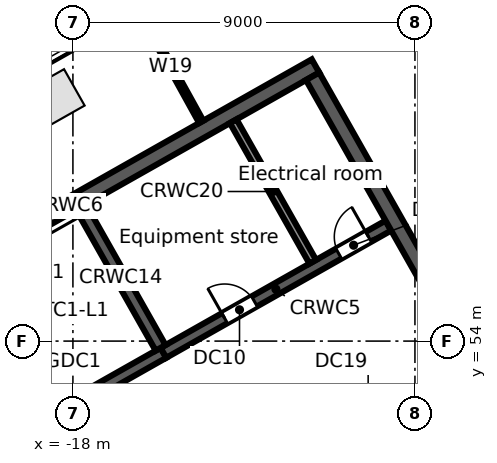
"""IFC4 building model, lengths in metres.
Left out: names, types, materials, properties, quantities, classifications, styles, units other than length and angle.
Written with IfcOpenShell. Run it as: python <this file> out.ifc"""

import sys

from ifc_helpers import new_model, si_unit, direction, frame, frame_2d, origin, origin_2d, place, context, subcontext, project, spatial, rectangle, extrude, element, fill, save


model = new_model("IFC4")
c1 = context("Model", 3, precision=1e-05, world=origin(), true_north=direction((0.0, 1.0)))
c2 = subcontext(c1, "Body", "Model", "MODEL_VIEW")
j1 = project(units=[si_unit("LENGTHUNIT", "METRE"), si_unit("PLANEANGLEUNIT", "RADIAN")], contexts=[c1])
p1 = place(None, origin())
s1 = spatial("IfcSite", under=j1, at=p1, CompositionType="ELEMENT")
p2 = place(p1, origin())
s2 = spatial("IfcBuilding", under=s1, at=p2, CompositionType="ELEMENT")
p3 = place(p2, frame((0.0, 0.0, 293.1)))
s3 = spatial("IfcBuildingStorey", under=s2, at=p3, CompositionType="ELEMENT", Elevation=293.1)
p4 = place(p3, frame((-18.441, 60.406, 0.0), z_axis=(0.0, 0.0, 1.0), x_axis=(-0.87035569594, -0.492423560103, 0.0)))
e1 = element("IfcColumn", 1, at=p4, inside=s3, PredefinedType="COLUMN", context=c2, shape_type="SweptSolid", body=[
    extrude(rectangle(XDim=1.1, YDim=1.1, at=origin_2d()), origin(), (0.0, 0.0, 1.0), 3.8),
])
p5 = place(p3, frame((-58.732, 38.771, 0.0), z_axis=(0.0, 0.0, 1.0), x_axis=(0.870355615581, 0.492423702137, 0.0)))
e2 = element("IfcWall", 2, at=p5, inside=s3, PredefinedType="STANDARD", context=c2, shape_type="SweptSolid", body=[
    extrude(rectangle(XDim=64.052, YDim=0.25, at=frame_2d((32.026, 0.0))), origin(), (0.0, 0.0, 1.0), 3.52),
])
p6 = place(p5, frame((61.259, 0.0, 0.8)))
e3 = element("IfcOpeningElement", 3, at=p6, cuts=e2, PredefinedType="OPENING", context=c2, shape_type="SweptSolid", body=[
    extrude(rectangle(XDim=2.4, YDim=2.2, at=frame_2d((1.2, 1.1))), frame((0.0, 0.135, 0.0), z_axis=(0.0, -1.0, 0.0), x_axis=(1.0, 0.0, 0.0)), (0.0, 0.0, 1.0), 0.27),
])
p7 = place(p5, frame((58.216, 0.0, 0.8)))
e4 = element("IfcOpeningElement", 4, at=p7, cuts=e2, PredefinedType="OPENING", context=c2, shape_type="SweptSolid", body=[
    extrude(rectangle(XDim=2.4, YDim=2.2, at=frame_2d((1.2, 1.1))), frame((0.0, 0.135, 0.0), z_axis=(0.0, -1.0, 0.0), x_axis=(1.0, 0.0, 0.0)), (0.0, 0.0, 1.0), 0.27),
])
p8 = place(p5, frame((55.173, 0.0, 0.8)))
e5 = element("IfcOpeningElement", 5, at=p8, cuts=e2, PredefinedType="OPENING", context=c2, shape_type="SweptSolid", body=[
    extrude(rectangle(XDim=2.4, YDim=2.2, at=frame_2d((1.2, 1.1))), frame((0.0, 0.135, 0.0), z_axis=(0.0, -1.0, 0.0), x_axis=(1.0, 0.0, 0.0)), (0.0, 0.0, 1.0), 0.27),
])
p9 = place(p5, frame((52.129, 0.0, 0.8)))
e6 = element("IfcOpeningElement", 6, at=p9, cuts=e2, PredefinedType="OPENING", context=c2, shape_type="SweptSolid", body=[
    extrude(rectangle(XDim=2.4, YDim=2.2, at=frame_2d((1.2, 1.1))), frame((0.0, 0.135, 0.0), z_axis=(0.0, -1.0, 0.0), x_axis=(1.0, 0.0, 0.0)), (0.0, 0.0, 1.0), 0.27),
])
p10 = place(p5, frame((49.086, 0.0, 0.8)))
e7 = element("IfcOpeningElement", 7, at=p10, cuts=e2, PredefinedType="OPENING", context=c2, shape_type="SweptSolid", body=[
    extrude(rectangle(XDim=2.4, YDim=2.2, at=frame_2d((1.2, 1.1))), frame((0.0, 0.135, 0.0), z_axis=(0.0, -1.0, 0.0), x_axis=(1.0, 0.0, 0.0)), (0.0, 0.0, 1.0), 0.27),
])
p11 = place(p5, frame((46.043, 0.0, 0.8)))
e8 = element("IfcOpeningElement", 8, at=p11, cuts=e2, PredefinedType="OPENING", context=c2, shape_type="SweptSolid", body=[
    extrude(rectangle(XDim=2.4, YDim=2.2, at=frame_2d((1.2, 1.1))), frame((0.0, 0.135, 0.0), z_axis=(0.0, -1.0, 0.0), x_axis=(1.0, 0.0, 0.0)), (0.0, 0.0, 1.0), 0.27),
])
p12 = place(p5, frame((43.0, 0.0, 0.8)))
e9 = element("IfcOpeningElement", 9, at=p12, cuts=e2, PredefinedType="OPENING", context=c2, shape_type="SweptSolid", body=[
    extrude(rectangle(XDim=2.4, YDim=2.2, at=frame_2d((1.2, 1.1))), frame((0.0, 0.135, 0.0), z_axis=(0.0, -1.0, 0.0), x_axis=(1.0, 0.0, 0.0)), (0.0, 0.0, 1.0), 0.27),
])
p13 = place(p5, frame((39.956, 0.0, 0.8)))
e10 = element("IfcOpeningElement", 10, at=p13, cuts=e2, PredefinedType="OPENING", context=c2, shape_type="SweptSolid", body=[
    extrude(rectangle(XDim=2.4, YDim=2.2, at=frame_2d((1.2, 1.1))), frame((0.0, 0.135, 0.0), z_axis=(0.0, -1.0, 0.0), x_axis=(1.0, 0.0, 0.0)), (0.0, 0.0, 1.0), 0.27),
])
p14 = place(p5, frame((36.913, 0.0, 0.8)))
e11 = element("IfcOpeningElement", 11, at=p14, cuts=e2, PredefinedType="OPENING", context=c2, shape_type="SweptSolid", body=[
    extrude(rectangle(XDim=2.4, YDim=2.2, at=frame_2d((1.2, 1.1))), frame((0.0, 0.135, 0.0), z_axis=(0.0, -1.0, 0.0), x_axis=(1.0, 0.0, 0.0)), (0.0, 0.0, 1.0), 0.27),
])
p15 = place(p5, frame((33.87, 0.0, 0.8)))
e12 = element("IfcOpeningElement", 12, at=p15, cuts=e2, PredefinedType="OPENING", context=c2, shape_type="SweptSolid", body=[
    extrude(rectangle(XDim=2.4, YDim=2.2, at=frame_2d((1.2, 1.1))), frame((0.0, 0.135, 0.0), z_axis=(0.0, -1.0, 0.0), x_axis=(1.0, 0.0, 0.0)), (0.0, 0.0, 1.0), 0.27),
])
p16 = place(p5, frame((30.826, 0.0, 0.8)))
e13 = element("IfcOpeningElement", 13, at=p16, cuts=e2, PredefinedType="OPENING", context=c2, shape_type="SweptSolid", body=[
    extrude(rectangle(XDim=2.4, YDim=2.2, at=frame_2d((1.2, 1.1))), frame((0.0, 0.135, 0.0), z_axis=(0.0, -1.0, 0.0), x_axis=(1.0, 0.0, 0.0)), (0.0, 0.0, 1.0), 0.27),
])
p17 = place(p5, frame((27.783, 0.0, 0.8)))
e14 = element("IfcOpeningElement", 14, at=p17, cuts=e2, PredefinedType="OPENING", context=c2, shape_type="SweptSolid", body=[
    extrude(rectangle(XDim=2.4, YDim=2.2, at=frame_2d((1.2, 1.1))), frame((0.0, 0.135, 0.0), z_axis=(0.0, -1.0, 0.0), x_axis=(1.0, 0.0, 0.0)), (0.0, 0.0, 1.0), 0.27),
])
p18 = place(p5, frame((24.74, 0.0, 0.8)))
e15 = element("IfcOpeningElement", 15, at=p18, cuts=e2, PredefinedType="OPENING", context=c2, shape_type="SweptSolid", body=[
    extrude(rectangle(XDim=2.4, YDim=2.2, at=frame_2d((1.2, 1.1))), frame((0.0, 0.135, 0.0), z_axis=(0.0, -1.0, 0.0), x_axis=(1.0, 0.0, 0.0)), (0.0, 0.0, 1.0), 0.27),
])
p19 = place(p5, frame((21.696, 0.0, 0.8)))
e16 = element("IfcOpeningElement", 16, at=p19, cuts=e2, PredefinedType="OPENING", context=c2, shape_type="SweptSolid", body=[
    extrude(rectangle(XDim=2.4, YDim=2.2, at=frame_2d((1.2, 1.1))), frame((0.0, 0.135, 0.0), z_axis=(0.0, -1.0, 0.0), x_axis=(1.0, 0.0, 0.0)), (0.0, 0.0, 1.0), 0.27),
])
p20 = place(p5, frame((18.653, 0.0, 0.8)))
e17 = element("IfcOpeningElement", 17, at=p20, cuts=e2, PredefinedType="OPENING", context=c2, shape_type="SweptSolid", body=[
    extrude(rectangle(XDim=2.4, YDim=2.2, at=frame_2d((1.2, 1.1))), frame((0.0, 0.135, 0.0), z_axis=(0.0, -1.0, 0.0), x_axis=(1.0, 0.0, 0.0)), (0.0, 0.0, 1.0), 0.27),
])
p21 = place(p5, frame((15.61, 0.0, 0.8)))
e18 = element("IfcOpeningElement", 18, at=p21, cuts=e2, PredefinedType="OPENING", context=c2, shape_type="SweptSolid", body=[
    extrude(rectangle(XDim=2.4, YDim=2.2, at=frame_2d((1.2, 1.1))), frame((0.0, 0.135, 0.0), z_axis=(0.0, -1.0, 0.0), x_axis=(1.0, 0.0, 0.0)), (0.0, 0.0, 1.0), 0.27),
])
p22 = place(p5, frame((12.567, 0.0, 0.8)))
e19 = element("IfcOpeningElement", 19, at=p22, cuts=e2, PredefinedType="OPENING", context=c2, shape_type="SweptSolid", body=[
    extrude(rectangle(XDim=2.4, YDim=2.2, at=frame_2d((1.2, 1.1))), frame((0.0, 0.135, 0.0), z_axis=(0.0, -1.0, 0.0), x_axis=(1.0, 0.0, 0.0)), (0.0, 0.0, 1.0), 0.27),
])
p23 = place(p5, frame((9.523, 0.0, 0.8)))
e20 = element("IfcOpeningElement", 20, at=p23, cuts=e2, PredefinedType="OPENING", context=c2, shape_type="SweptSolid", body=[
    extrude(rectangle(XDim=2.4, YDim=2.2, at=frame_2d((1.2, 1.1))), frame((0.0, 0.135, 0.0), z_axis=(0.0, -1.0, 0.0), x_axis=(1.0, 0.0, 0.0)), (0.0, 0.0, 1.0), 0.27),
])
p24 = place(p5, frame((6.48, 0.0, 0.8)))
e21 = element("IfcOpeningElement", 21, at=p24, cuts=e2, PredefinedType="OPENING", context=c2, shape_type="SweptSolid", body=[
    extrude(rectangle(XDim=2.4, YDim=2.2, at=frame_2d((1.2, 1.1))), frame((0.0, 0.135, 0.0), z_axis=(0.0, -1.0, 0.0), x_axis=(1.0, 0.0, 0.0)), (0.0, 0.0, 1.0), 0.27),
])
p25 = place(p5, frame((3.437, 0.0, 0.8)))
e22 = element("IfcOpeningElement", 22, at=p25, cuts=e2, PredefinedType="OPENING", context=c2, shape_type="SweptSolid", body=[
    extrude(rectangle(XDim=2.4, YDim=2.2, at=frame_2d((1.2, 1.1))), frame((0.0, 0.135, 0.0), z_axis=(0.0, -1.0, 0.0), x_axis=(1.0, 0.0, 0.0)), (0.0, 0.0, 1.0), 0.27),
])
p26 = place(p5, frame((0.393, 0.0, 0.8)))
e23 = element("IfcOpeningElement", 23, at=p26, cuts=e2, PredefinedType="OPENING", context=c2, shape_type="SweptSolid", body=[
    extrude(rectangle(XDim=2.4, YDim=2.2, at=frame_2d((1.2, 1.1))), frame((0.0, 0.135, 0.0), z_axis=(0.0, -1.0, 0.0), x_axis=(1.0, 0.0, 0.0)), (0.0, 0.0, 1.0), 0.27),
])
p27 = place(p3, frame((-13.365, 49.911, 0.0), z_axis=(0.0, 0.0, 1.0), x_axis=(0.870347618718, 0.492437836272, 0.0)))
e24 = element("IfcWall", 24, at=p27, inside=s3, PredefinedType="SOLIDWALL", context=c2, shape_type="SweptSolid", body=[
    extrude(rectangle(XDim=6.7, YDim=0.3, at=frame_2d((3.35, 0.0))), origin(), (0.0, 0.0, 1.0), 3.52),
])
p28 = place(p27, frame((0.75, 0.0, 0.0)))
e25 = element("IfcOpeningElement", 25, at=p28, cuts=e24, PredefinedType="OPENING", context=c2, shape_type="SweptSolid", body=[
    extrude(rectangle(XDim=0.9, YDim=2.1, at=frame_2d((0.45, 1.05))), frame((0.0, 0.16, 0.0), z_axis=(0.0, -1.0, 0.0), x_axis=(1.0, 0.0, 0.0)), (0.0, 0.0, 1.0), 0.32),
])
p29 = place(p27, frame((3.15, 0.0, 0.0)))
e26 = element("IfcOpeningElement", 26, at=p29, cuts=e24, PredefinedType="OPENING", context=c2, shape_type="SweptSolid", body=[
    extrude(rectangle(XDim=0.9, YDim=2.1, at=frame_2d((0.45, 1.05))), frame((0.0, 0.16, 0.0), z_axis=(0.0, -1.0, 0.0), x_axis=(1.0, 0.0, 0.0)), (0.0, 0.0, 1.0), 0.32),
])
p30 = place(p27, frame((5.35, 0.0, 0.0)))
e27 = element("IfcOpeningElement", 27, at=p30, cuts=e24, PredefinedType="OPENING", context=c2, shape_type="SweptSolid", body=[
    extrude(rectangle(XDim=0.9, YDim=2.1, at=frame_2d((0.45, 1.05))), frame((0.0, 0.16, 0.0), z_axis=(0.0, -1.0, 0.0), x_axis=(1.0, 0.0, 0.0)), (0.0, 0.0, 1.0), 0.32),
])
p31 = place(p3, frame((-22.059, 50.047, 0.0), z_axis=(0.0, 0.0, 1.0), x_axis=(0.87035077051, 0.49243226567, 0.0)))
e28 = element("IfcWall", 28, at=p31, inside=s3, PredefinedType="SOLIDWALL", context=c2, shape_type="SweptSolid", body=[
    extrude(rectangle(XDim=7.4, YDim=0.3, at=frame_2d((3.7, 0.0))), origin(), (0.0, 0.0, 1.0), 3.52),
])
p32 = place(p31, frame((0.4, 0.0, 0.0)))
e29 = element("IfcOpeningElement", 29, at=p32, cuts=e28, PredefinedType="OPENING", context=c2, shape_type="SweptSolid", body=[
    extrude(rectangle(XDim=1.0, YDim=2.1, at=frame_2d((0.5, 1.05))), frame((0.0, 0.16, 0.0), z_axis=(0.0, -1.0, 0.0), x_axis=(1.0, 0.0, 0.0)), (0.0, 0.0, 1.0), 0.32),
])
p33 = place(p3, frame((-15.618, 53.691, 0.0), z_axis=(0.0, 0.0, 1.0), x_axis=(0.870362830851, 0.492410948978, 0.0)))
e30 = element("IfcWall", 30, at=p33, inside=s3, PredefinedType="SOLIDWALL", context=c2, shape_type="SweptSolid", body=[
    extrude(rectangle(XDim=6.8, YDim=0.3, at=frame_2d((3.4, 0.0))), origin(), (0.0, 0.0, 1.0), 3.52),
])
p34 = place(p33, frame((1.85, 0.0, 0.0)))
e31 = element("IfcOpeningElement", 31, at=p34, cuts=e30, PredefinedType="OPENING", context=c2, shape_type="SweptSolid", body=[
    extrude(rectangle(XDim=0.9, YDim=2.1, at=frame_2d((0.45, 1.05))), frame((0.0, 0.16, 0.0), z_axis=(0.0, -1.0, 0.0), x_axis=(1.0, 0.0, 0.0)), (0.0, 0.0, 1.0), 0.32),
])
p35 = place(p33, frame((5.3, 0.0, 0.0)))
e32 = element("IfcOpeningElement", 32, at=p35, cuts=e30, PredefinedType="OPENING", context=c2, shape_type="SweptSolid", body=[
    extrude(rectangle(XDim=0.9, YDim=2.1, at=frame_2d((0.45, 1.05))), frame((0.0, 0.16, 0.0), z_axis=(0.0, -1.0, 0.0), x_axis=(1.0, 0.0, 0.0)), (0.0, 0.0, 1.0), 0.32),
])
p36 = place(p3, frame((-24.672, 53.854, 0.0), z_axis=(0.0, 0.0, 1.0), x_axis=(0.870353598469, 0.492427267353, 0.0)))
e33 = element("IfcWall", 33, at=p36, inside=s3, PredefinedType="SOLIDWALL", context=c2, shape_type="SweptSolid", body=[
    extrude(rectangle(XDim=15.0, YDim=0.4, at=frame_2d((7.5, 0.0))), origin(), (0.0, 0.0, 1.0), 3.52),
])
p37 = place(p3, frame((-24.4, 53.779, 0.0), z_axis=(0.0, 0.0, 1.0), x_axis=(0.492421663121, -0.870356769198, 0.0)))
e34 = element("IfcWall", 34, at=p37, inside=s3, PredefinedType="SOLIDWALL", context=c2, shape_type="SweptSolid", body=[
    extrude(rectangle(XDim=13.2, YDim=0.4, at=frame_2d((6.6, 0.0))), origin(), (0.0, 0.0, 1.0), 3.52),
])
p38 = place(p3, frame((-17.785, 57.521, 0.0), z_axis=(0.0, 0.0, 1.0), x_axis=(0.492422543467, -0.870356271124, 0.0)))
e35 = element("IfcWall", 35, at=p38, inside=s3, PredefinedType="SOLIDWALL", context=c2, shape_type="SweptSolid", body=[
    extrude(rectangle(XDim=4.25, YDim=0.3, at=frame_2d((2.125, 0.0))), origin(), (0.0, 0.0, 1.0), 3.52),
])
p39 = place(p3, frame((-13.781, 59.786, 0.0), z_axis=(0.0, 0.0, 1.0), x_axis=(0.492422543467, -0.870356271124, 0.0)))
e36 = element("IfcWall", 36, at=p39, inside=s3, PredefinedType="PARTITIONING", context=c2, shape_type="SweptSolid", body=[
    extrude(rectangle(XDim=4.25, YDim=0.2, at=frame_2d((2.125, 0.0))), origin(), (0.0, 0.0, 1.0), 3.52),
])
p40 = place(p3, frame((-11.692, 60.968, 0.0), z_axis=(0.0, 0.0, 1.0), x_axis=(0.492421663121, -0.870356769198, 0.0)))
e37 = element("IfcWall", 37, at=p40, inside=s3, PredefinedType="SOLIDWALL", context=c2, shape_type="SweptSolid", body=[
    extrude(rectangle(XDim=13.2, YDim=0.4, at=frame_2d((6.6, 0.0))), origin(), (0.0, 0.0, 1.0), 3.52),
])
p41 = place(p3, frame((-16.229, 62.675, 0.0), z_axis=(0.0, 0.0, 1.0), x_axis=(0.483687594014, -0.875240716259, 0.0)))
e38 = element("IfcWall", 38, at=p41, inside=s3, PredefinedType="PARTITIONING", context=c2, shape_type="SweptSolid", body=[
    extrude(rectangle(XDim=3.32, YDim=0.125, at=frame_2d((1.66, 0.0))), origin(), (0.0, 0.0, 1.0), 2.888),
])
p42 = place(p11, origin())
e39 = element("IfcWindow", 39, at=p42, inside=s3, PartitioningType="SINGLE_PANEL", PredefinedType="WINDOW", context=c2, shape_type="SweptSolid", body=[
    extrude(rectangle(XDim=2.4, YDim=2.2, at=frame_2d((1.2, 1.1))), frame((0.0, 0.03, 0.0), z_axis=(0.0, -1.0, 0.0), x_axis=(1.0, 0.0, 0.0)), (0.0, 0.0, 1.0), 0.06),
])
fill(e8, e39)
p43 = place(p34, origin())
e40 = element("IfcDoor", 40, at=p43, inside=s3, OperationType="SINGLE_SWING_LEFT", PredefinedType="DOOR", context=c2, shape_type="SweptSolid", body=[
    extrude(rectangle(XDim=0.9, YDim=2.1, at=frame_2d((0.45, 1.05))), frame((0.0, 0.025, 0.0), z_axis=(0.0, -1.0, 0.0), x_axis=(1.0, 0.0, 0.0)), (0.0, 0.0, 1.0), 0.05),
])
fill(e31, e40)
p44 = place(p35, origin())
e41 = element("IfcDoor", 41, at=p44, inside=s3, OperationType="SINGLE_SWING_RIGHT", PredefinedType="DOOR", context=c2, shape_type="SweptSolid", body=[
    extrude(rectangle(XDim=0.9, YDim=2.1, at=frame_2d((0.45, 1.05))), frame((0.0, 0.025, 0.0), z_axis=(0.0, -1.0, 0.0), x_axis=(1.0, 0.0, 0.0)), (0.0, 0.0, 1.0), 0.05),
])
fill(e32, e41)
save(model, sys.argv[1])
